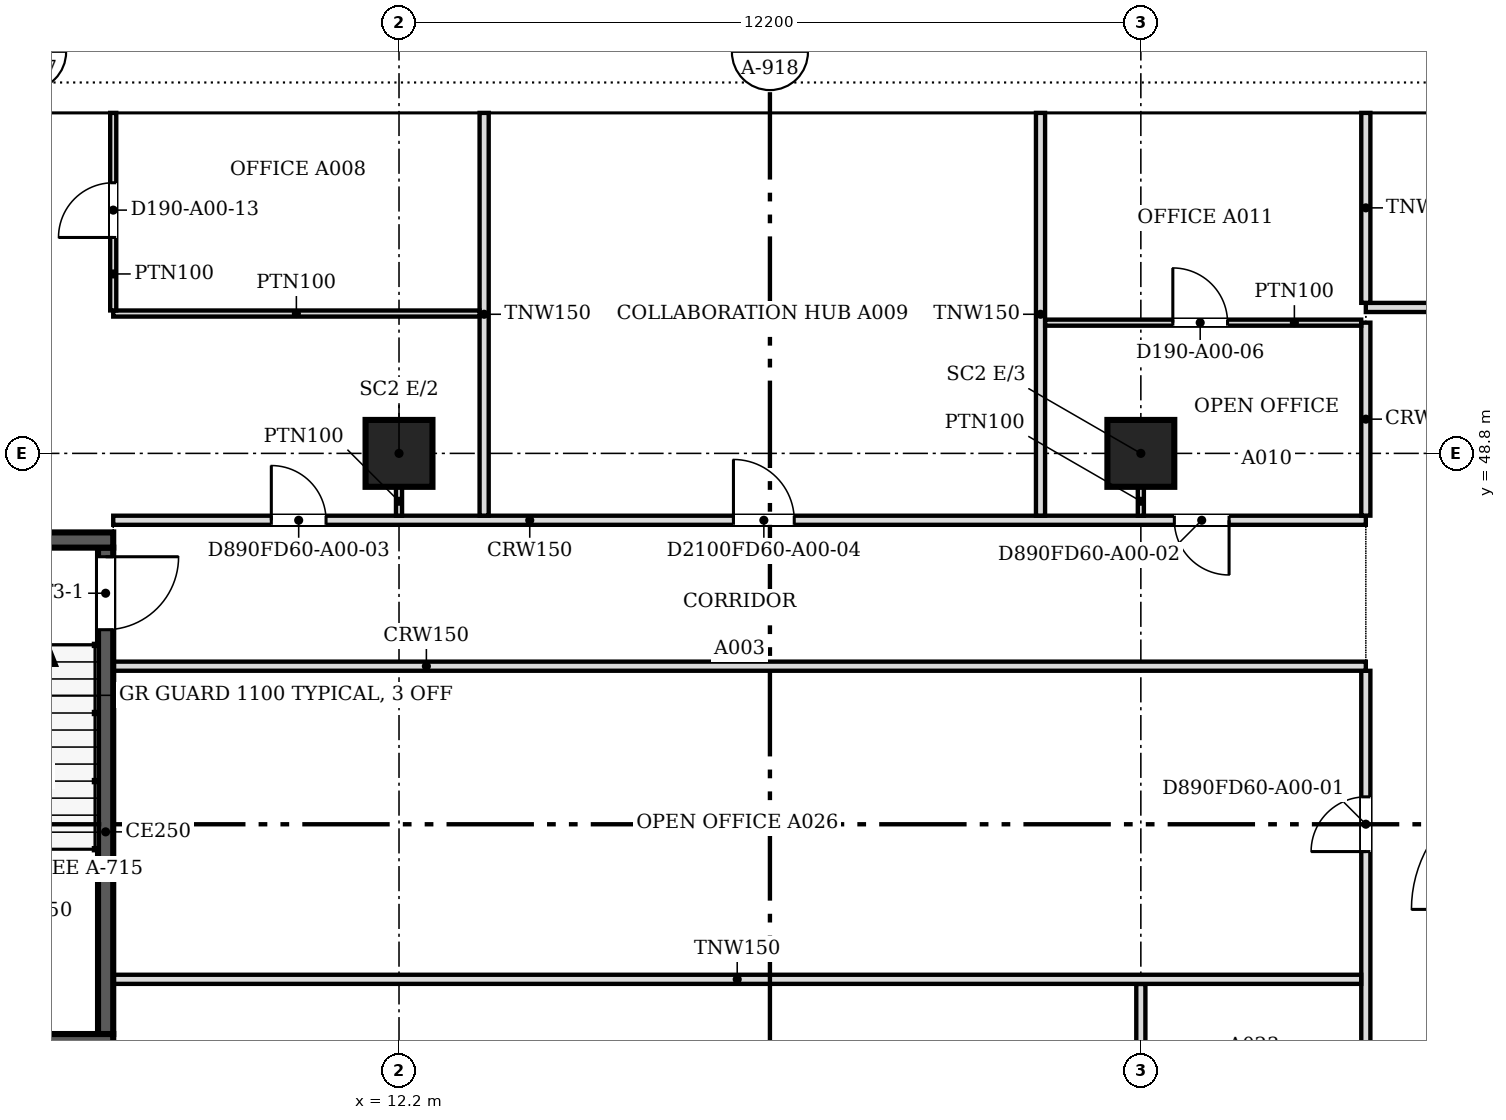
"""IFC4 building model, lengths in metres.
Left out: names, types, materials, properties, quantities, classifications, styles, units other than length and angle.
Written with IfcOpenShell. Run it as: python <this file> out.ifc"""

import sys

from ifc_helpers import new_model, si_unit, direction, frame, frame_2d, origin, origin_2d, place, context, subcontext, project, spatial, polyline, rectangle, outline, extrude, faceted_brep, source, transform, mapped, element, fill, save


model = new_model("IFC4")
c1 = context("Model", 3, precision=1e-05, world=origin(), true_north=direction((0.0, 1.0)))
c2 = subcontext(c1, "Body", "Model", "MODEL_VIEW")
j1 = project(units=[si_unit("LENGTHUNIT", "METRE"), si_unit("PLANEANGLEUNIT", "RADIAN")], contexts=[c1])
p1 = place(None, origin())
s1 = spatial("IfcSite", under=j1, at=p1, CompositionType="ELEMENT")
p2 = place(p1, origin())
s2 = spatial("IfcBuilding", under=s1, at=p2, CompositionType="ELEMENT")
p3 = place(p2, frame((0.0, 0.0, 16.8)))
s3 = spatial("IfcBuildingStorey", under=s2, at=p3, CompositionType="ELEMENT", Elevation=16.8)
for number, where, z_axis, x_axis in (
    (1, (12.2, 48.8, 0.0), (0.0, 0.0, 1.0), (1.0, 0.0, 0.0)),
    (2, (24.4, 48.8, 0.0), (0.0, 0.0, 1.0), (1.0, 0.0, 0.0)),
):
    element("IfcColumn", number, at=place(p3, frame(where, z_axis=z_axis, x_axis=x_axis)), inside=s3, PredefinedType="COLUMN", context=c2, shape_type="SweptSolid", body=[
        extrude(rectangle(XDim=1.1, YDim=1.1, at=origin_2d()), origin(), (0.0, 0.0, 1.0), 4.3),
    ])
m1 = source(origin(), c2, "Body", "SweptSolid", [
    extrude(outline(polyline([(6.1, 0.0), (3.05, 4.5), (0.0, 0.0), (6.1, 0.0)])), frame((0.0, 0.25, 0.0), z_axis=(0.0, -1.0, 0.0), x_axis=(1.0, 0.0, 0.0)), (0.0, 0.0, 1.0), 0.5),
])
p4 = place(p3, frame((33.55, 54.65, 0.0), z_axis=(0.0, 0.0, 1.0), x_axis=(-1.0, 0.0, 0.0)))
e3 = element("IfcWall", 3, at=p4, inside=s3, PredefinedType="SOLIDWALL", context=c2, shape_type="MappedRepresentation", body=[
    mapped(m1, transform((0.0, 0.0, 0.0), scale=1.0)),
])
m2 = source(origin(), c2, "Body", "SweptSolid", [
    extrude(outline(polyline([(5.629, 0.25), (3.05, 4.054), (0.471, 0.25), (5.629, 0.25)])), frame((0.0, 0.26, 0.0), z_axis=(0.0, -1.0, 0.0), x_axis=(1.0, 0.0, 0.0)), (0.0, 0.0, 1.0), 0.52),
])
p5 = place(p4, origin())
e4 = element("IfcOpeningElement", 4, at=p5, cuts=e3, PredefinedType="OPENING", context=c2, shape_type="MappedRepresentation", body=[
    mapped(m2, transform((0.0, 0.0, 0.0), scale=1.0)),
])
m3 = source(origin(), c2, "Body", "Brep", [
    faceted_brep([(6.1, -0.25, 0.0), (3.05, -0.25, 4.5), (0.0, -0.25, 0.0), (6.1, -0.25, 0.0), (0.0, 0.25, 0.0), (3.05, 0.25, 4.5), (6.1, 0.25, 0.0), (6.1, 0.25, 0.0)], [[[0, 1, 2, 3]], [[4, 5, 6, 7]], [[6, 5, 1, 0]], [[5, 4, 2, 1]], [[4, 7, 3, 2]], [[3, 7, 6, 0]]]),
])
p6 = place(p3, frame((27.45, 54.65, 0.0), z_axis=(0.0, 0.0, 1.0), x_axis=(-1.0, 0.0, 0.0)))
e5 = element("IfcWall", 5, at=p6, inside=s3, PredefinedType="SOLIDWALL", context=c2, shape_type="MappedRepresentation", body=[
    mapped(m3, transform((0.0, 0.0, 0.0), scale=1.0)),
])
p7 = place(p6, origin())
e6 = element("IfcOpeningElement", 6, at=p7, cuts=e5, PredefinedType="OPENING", context=c2, shape_type="MappedRepresentation", body=[
    mapped(m2, transform((0.0, 0.0, 0.0), scale=1.0)),
])
p8 = place(p3, frame((21.35, 54.65, 0.0), z_axis=(0.0, 0.0, 1.0), x_axis=(-1.0, 0.0, 0.0)))
e7 = element("IfcWall", 7, at=p8, inside=s3, PredefinedType="SOLIDWALL", context=c2, shape_type="MappedRepresentation", body=[
    mapped(m1, transform((0.0, 0.0, 0.0), scale=1.0)),
])
p9 = place(p8, origin())
e8 = element("IfcOpeningElement", 8, at=p9, cuts=e7, PredefinedType="OPENING", context=c2, shape_type="MappedRepresentation", body=[
    mapped(m2, transform((0.0, 0.0, 0.0), scale=1.0)),
])
p10 = place(p3, frame((15.25, 54.65, 0.0), z_axis=(0.0, 0.0, 1.0), x_axis=(-1.0, 0.0, 0.0)))
e9 = element("IfcWall", 9, at=p10, inside=s3, PredefinedType="SOLIDWALL", context=c2, shape_type="MappedRepresentation", body=[
    mapped(m1, transform((0.0, 0.0, 0.0), scale=1.0)),
])
p11 = place(p10, origin())
e10 = element("IfcOpeningElement", 10, at=p11, cuts=e9, PredefinedType="OPENING", context=c2, shape_type="MappedRepresentation", body=[
    mapped(m2, transform((0.0, 0.0, 0.0), scale=1.0)),
])
m4 = source(origin(), c2, "Body", "Brep", [
    faceted_brep([(3.05, -0.25, 4.429), (3.003, -0.25, 4.5), (0.0, -0.25, 0.0), (3.05, -0.25, 0.0), (0.0, 0.25, 0.0), (2.957, 0.25, 4.43), (2.957, 0.25, 0.0), (3.003, 0.0, 4.5)], [[[0, 1, 2, 3]], [[4, 5, 6]], [[7, 1, 0]], [[5, 4, 2, 1, 7]], [[4, 6, 3, 2]], [[3, 6, 5, 7, 0]]]),
])
p12 = place(p3, frame((9.15, 54.65, 0.0), z_axis=(0.0, 0.0, 1.0), x_axis=(-1.0, 0.0, 0.0)))
e11 = element("IfcWall", 11, at=p12, inside=s3, PredefinedType="SOLIDWALL", context=c2, shape_type="MappedRepresentation", body=[
    mapped(m4, transform((0.0, 0.0, 0.0), scale=1.0)),
])
m5 = source(origin(), c2, "Body", "SweptSolid", [
    extrude(outline(polyline([(2.803, 3.75), (0.468, 0.25), (2.803, 0.25), (2.803, 3.75)])), frame((0.0, 0.26, 0.0), z_axis=(0.0, -1.0, 0.0), x_axis=(1.0, 0.0, 0.0)), (0.0, 0.0, 1.0), 0.52),
])
p13 = place(p12, origin())
e12 = element("IfcOpeningElement", 12, at=p13, cuts=e11, PredefinedType="OPENING", context=c2, shape_type="MappedRepresentation", body=[
    mapped(m5, transform((0.0, 0.0, 0.0), scale=1.0)),
])
p14 = place(p2, frame((0.0, 0.0, 21.3)))
s4 = spatial("IfcBuildingStorey", under=s2, at=p14, CompositionType="ELEMENT", Elevation=21.3)
m6 = source(origin(), c2, "Body", "SweptSolid", [
    extrude(outline(polyline([(3.05, 0.0), (6.1, 4.5), (3.05, 9.0), (0.0, 4.5), (3.05, 0.0)])), frame((0.0, 0.25, 0.0), z_axis=(0.0, -1.0, 0.0), x_axis=(1.0, 0.0, 0.0)), (0.0, 0.0, 1.0), 0.5),
])
p15 = place(p14, frame((30.5, 54.65, -4.5), z_axis=(0.0, 0.0, 1.0), x_axis=(-1.0, 0.0, 0.0)))
e13 = element("IfcWall", 13, at=p15, inside=s4, PredefinedType="SOLIDWALL", context=c2, shape_type="MappedRepresentation", body=[
    mapped(m6, transform((0.0, 0.0, 0.0), scale=1.0)),
])
m7 = source(origin(), c2, "Body", "SweptSolid", [
    extrude(outline(polyline([(3.05, 0.446), (5.798, 4.5), (3.05, 8.554), (0.302, 4.5), (3.05, 0.446)])), frame((0.0, 0.26, 0.0), z_axis=(0.0, -1.0, 0.0), x_axis=(1.0, 0.0, 0.0)), (0.0, 0.0, 1.0), 0.52),
])
p16 = place(p15, origin())
e14 = element("IfcOpeningElement", 14, at=p16, cuts=e13, PredefinedType="OPENING", context=c2, shape_type="MappedRepresentation", body=[
    mapped(m7, transform((0.0, 0.0, 0.0), scale=1.0)),
])
m8 = source(origin(), c2, "Body", "Brep", [
    faceted_brep([(3.05, -0.25, 0.0), (6.1, -0.25, 4.5), (6.1, -0.25, 4.5), (3.05, -0.25, 9.0), (0.0, -0.25, 4.5), (0.0, 0.25, 4.5), (3.05, 0.25, 9.0), (6.1, 0.25, 4.5), (6.1, 0.25, 4.5), (3.05, 0.25, 0.0)], [[[0, 1, 2, 3, 4]], [[5, 6, 7, 8, 9]], [[9, 8, 1, 0]], [[7, 6, 3, 2]], [[6, 5, 4, 3]], [[5, 9, 0, 4]], [[1, 8, 7, 2]]]),
])
p17 = place(p14, frame((24.4, 54.65, -4.5), z_axis=(0.0, 0.0, 1.0), x_axis=(-1.0, 0.0, 0.0)))
e15 = element("IfcWall", 15, at=p17, inside=s4, PredefinedType="SOLIDWALL", context=c2, shape_type="MappedRepresentation", body=[
    mapped(m8, transform((0.0, 0.0, 0.0), scale=1.0)),
])
p18 = place(p17, origin())
e16 = element("IfcOpeningElement", 16, at=p18, cuts=e15, PredefinedType="OPENING", context=c2, shape_type="MappedRepresentation", body=[
    mapped(m7, transform((0.0, 0.0, 0.0), scale=1.0)),
])
p19 = place(p14, frame((18.3, 54.65, -4.5), z_axis=(0.0, 0.0, 1.0), x_axis=(-1.0, 0.0, 0.0)))
e17 = element("IfcWall", 17, at=p19, inside=s4, PredefinedType="SOLIDWALL", context=c2, shape_type="MappedRepresentation", body=[
    mapped(m6, transform((0.0, 0.0, 0.0), scale=1.0)),
])
p20 = place(p19, origin())
e18 = element("IfcOpeningElement", 18, at=p20, cuts=e17, PredefinedType="OPENING", context=c2, shape_type="MappedRepresentation", body=[
    mapped(m7, transform((0.0, 0.0, 0.0), scale=1.0)),
])
m9 = source(origin(), c2, "Body", "Brep", [
    faceted_brep([(3.05, -0.25, 0.0), (6.053, -0.25, 4.5), (3.05, -0.25, 9.0), (0.0, -0.25, 4.5), (0.0, 0.25, 4.5), (3.05, 0.25, 9.0), (6.007, 0.25, 4.57), (6.007, 0.25, 4.43), (3.05, 0.25, 0.0), (6.053, 0.0, 4.5)], [[[0, 1, 2, 3]], [[4, 5, 6, 7, 8]], [[8, 7, 9, 1, 0]], [[6, 5, 2, 1, 9]], [[5, 4, 3, 2]], [[4, 8, 0, 3]], [[9, 7, 6]]]),
])
p21 = place(p14, frame((12.2, 54.65, -4.5), z_axis=(0.0, 0.0, 1.0), x_axis=(-1.0, 0.0, 0.0)))
e19 = element("IfcWall", 19, at=p21, inside=s4, PredefinedType="SOLIDWALL", context=c2, shape_type="MappedRepresentation", body=[
    mapped(m9, transform((0.0, 0.0, 0.0), scale=1.0)),
])
m10 = source(origin(), c2, "Body", "SweptSolid", [
    extrude(outline(polyline([(3.048, 0.448), (5.753, 4.5), (3.048, 8.552), (0.302, 4.5), (3.048, 0.448)])), frame((0.0, 0.26, 0.0), z_axis=(0.0, -1.0, 0.0), x_axis=(1.0, 0.0, 0.0)), (0.0, 0.0, 1.0), 0.52),
])
p22 = place(p21, origin())
e20 = element("IfcOpeningElement", 20, at=p22, cuts=e19, PredefinedType="OPENING", context=c2, shape_type="MappedRepresentation", body=[
    mapped(m10, transform((0.0, 0.0, 0.0), scale=1.0)),
])
for number, where, z_axis, x_axis in (
    (21, (7.5, 39.125, 0.0), (0.0, 0.0, 1.0), (-1.0, 0.0, 0.0)),
    (22, (3.6, 47.375, 0.0), (0.0, 0.0, 1.0), (1.0, 0.0, 0.0)),
):
    element("IfcWall", number, at=place(p3, frame(where, z_axis=z_axis, x_axis=x_axis)), inside=s3, PredefinedType="SOLIDWALL", context=c2, shape_type="SweptSolid", body=[
        extrude(rectangle(XDim=3.9, YDim=0.25, at=frame_2d((1.95, 0.0))), origin(), (0.0, 0.0, 1.0), 4.5),
    ])
p23 = place(p3, frame((7.375, 47.25, 0.0), z_axis=(0.0, 0.0, 1.0), x_axis=(0.0, -1.0, 0.0)))
e23 = element("IfcWall", 23, at=p23, inside=s3, PredefinedType="SOLIDWALL", context=c2, shape_type="SweptSolid", body=[
    extrude(rectangle(XDim=8.0, YDim=0.25, at=frame_2d((4.0, 0.0))), origin(), (0.0, 0.0, 1.0), 4.5),
])
m11 = source(origin(), c2, "Body", "SweptSolid", [
    extrude(rectangle(XDim=1.2, YDim=2.1, at=frame_2d((0.6, 1.05))), frame((0.0, 0.135, 0.0), z_axis=(0.0, -1.0, 0.0), x_axis=(1.0, 0.0, 0.0)), (0.0, 0.0, 1.0), 0.27),
])
p24 = place(p23, frame((0.15, 0.0, 0.0)))
e24 = element("IfcOpeningElement", 24, at=p24, cuts=e23, PredefinedType="OPENING", context=c2, shape_type="MappedRepresentation", body=[
    mapped(m11, transform((0.0, 0.0, 0.0), scale=1.0)),
])
p25 = place(p3, frame((28.1, 18.8, 0.0), z_axis=(0.0, 0.0, 1.0), x_axis=(0.0, 1.0, 0.0)))
e25 = element("IfcWall", 25, at=p25, inside=s3, PredefinedType="PARTITIONING", context=c2, shape_type="SweptSolid", body=[
    extrude(rectangle(XDim=26.424, YDim=0.15, at=frame_2d((13.212, 0.0))), origin(), (0.0, 0.0, 1.0), 3.415),
])
m12 = source(origin(), c2, "Body", "SweptSolid", [
    extrude(rectangle(XDim=0.9, YDim=2.1, at=frame_2d((0.45, 1.05))), frame((0.0, 0.085, 0.0), z_axis=(0.0, -1.0, 0.0), x_axis=(1.0, 0.0, 0.0)), (0.0, 0.0, 1.0), 0.17),
])
p26 = place(p25, frame((23.451, 0.0, 0.0)))
e26 = element("IfcOpeningElement", 26, at=p26, cuts=e25, PredefinedType="OPENING", context=c2, shape_type="MappedRepresentation", body=[
    mapped(m12, transform((0.0, 0.0, 0.0), scale=1.0)),
])
m13 = source(origin(), c2, "Body", "SweptSolid", [
    extrude(rectangle(XDim=1.0, YDim=2.1, at=frame_2d((0.5, 1.05))), frame((0.0, 0.085, 0.0), z_axis=(0.0, -1.0, 0.0), x_axis=(1.0, 0.0, 0.0)), (0.0, 0.0, 1.0), 0.17),
])
p27 = place(p25, frame((5.7, 0.0, 0.0)))
e27 = element("IfcOpeningElement", 27, at=p27, cuts=e25, PredefinedType="OPENING", context=c2, shape_type="MappedRepresentation", body=[
    mapped(m13, transform((0.0, 0.0, 0.0), scale=1.0)),
])
p28 = place(p25, frame((11.65, 0.0, 0.0)))
e28 = element("IfcOpeningElement", 28, at=p28, cuts=e25, PredefinedType="OPENING", context=c2, shape_type="MappedRepresentation", body=[
    mapped(m13, transform((0.0, 0.0, 0.0), scale=1.0)),
])
p29 = place(p25, frame((17.75, 0.0, 0.0)))
e29 = element("IfcOpeningElement", 29, at=p29, cuts=e25, PredefinedType="OPENING", context=c2, shape_type="MappedRepresentation", body=[
    mapped(m13, transform((0.0, 0.0, 0.0), scale=1.0)),
])
p30 = place(p3, frame((24.4, 37.151, 0.0), z_axis=(0.0, 0.0, 1.0), x_axis=(0.0, 1.0, 0.0)))
e30 = element("IfcWall", 30, at=p30, inside=s3, PredefinedType="PARTITIONING", context=c2, shape_type="SweptSolid", body=[
    extrude(rectangle(XDim=2.923, YDim=0.15, at=frame_2d((1.461, 0.0))), origin(), (0.0, 0.0, 1.0), 3.415),
])
p31 = place(p3, frame((7.5, 40.15, 0.0), z_axis=(0.0, 0.0, 1.0), x_axis=(1.0, 0.0, 0.0)))
e31 = element("IfcWall", 31, at=p31, inside=s3, PredefinedType="PARTITIONING", context=c2, shape_type="SweptSolid", body=[
    extrude(rectangle(XDim=20.524, YDim=0.15, at=frame_2d((10.262, 0.0))), origin(), (0.0, 0.0, 1.0), 3.415),
])
p32 = place(p3, frame((7.5, 45.3, 0.0), z_axis=(0.0, 0.0, 1.0), x_axis=(1.0, 0.0, 0.0)))
e32 = element("IfcWall", 32, at=p32, inside=s3, PredefinedType="PARTITIONING", context=c2, shape_type="SweptSolid", body=[
    extrude(rectangle(XDim=20.6, YDim=0.15, at=frame_2d((10.3, 0.0))), origin(), (0.0, 0.0, 1.0), 3.415),
])
p33 = place(p3, frame((7.5, 47.7, 0.0), z_axis=(0.0, 0.0, 1.0), x_axis=(1.0, 0.0, 0.0)))
e33 = element("IfcWall", 33, at=p33, inside=s3, PredefinedType="PARTITIONING", context=c2, shape_type="SweptSolid", body=[
    extrude(rectangle(XDim=20.6, YDim=0.15, at=frame_2d((10.3, 0.0))), origin(), (0.0, 0.0, 1.0), 3.415),
])
p34 = place(p33, frame((17.451, 0.0, 0.0)))
e34 = element("IfcOpeningElement", 34, at=p34, cuts=e33, PredefinedType="OPENING", context=c2, shape_type="MappedRepresentation", body=[
    mapped(m12, transform((0.0, 0.0, 0.0), scale=1.0)),
])
p35 = place(p33, frame((2.6, 0.0, 0.0)))
e35 = element("IfcOpeningElement", 35, at=p35, cuts=e33, PredefinedType="OPENING", context=c2, shape_type="MappedRepresentation", body=[
    mapped(m12, transform((0.0, 0.0, 0.0), scale=1.0)),
])
p36 = place(p33, frame((10.2, 0.0, 0.0)))
e36 = element("IfcOpeningElement", 36, at=p36, cuts=e33, PredefinedType="OPENING", context=c2, shape_type="MappedRepresentation", body=[
    mapped(m13, transform((0.0, 0.0, 0.0), scale=1.0)),
])
for number, where, z_axis, x_axis in (
    (37, (13.6, 47.776, 0.0), (0.0, 0.0, 1.0), (0.0, 1.0, 0.0)),
    (38, (22.75, 47.776, 0.0), (0.0, 0.0, 1.0), (0.0, 1.0, 0.0)),
):
    element("IfcWall", number, at=place(p3, frame(where, z_axis=z_axis, x_axis=x_axis)), inside=s3, PredefinedType="PARTITIONING", context=c2, shape_type="SweptSolid", body=[
        extrude(rectangle(XDim=6.624, YDim=0.15, at=frame_2d((3.312, 0.0))), origin(), (0.0, 0.0, 1.0), 3.415),
    ])
p37 = place(p3, frame((28.1, 47.776, 0.0), z_axis=(0.0, 0.0, 1.0), x_axis=(0.0, 1.0, 0.0)))
e39 = element("IfcWall", 39, at=p37, inside=s3, PredefinedType="PARTITIONING", context=c2, shape_type="SweptSolid", body=[
    extrude(rectangle(XDim=3.174, YDim=0.15, at=frame_2d((1.587, 0.0))), origin(), (0.0, 0.0, 1.0), 3.415),
])
for number, where, z_axis, x_axis in (
    (40, (12.2, 48.25, 0.0), (0.0, 0.0, 1.0), (0.0, -1.0, 0.0)),
    (41, (24.4, 48.25, 0.0), (0.0, 0.0, 1.0), (0.0, -1.0, 0.0)),
):
    element("IfcWall", number, at=place(p3, frame(where, z_axis=z_axis, x_axis=x_axis)), inside=s3, PredefinedType="PARTITIONING", context=c2, shape_type="SweptSolid", body=[
        extrude(rectangle(XDim=0.475, YDim=0.1, at=frame_2d((0.238, 0.0))), origin(), (0.0, 0.0, 1.0), 3.415),
    ])
p38 = place(p3, frame((22.826, 50.95, 0.0), z_axis=(0.0, 0.0, 1.0), x_axis=(1.0, 0.0, 0.0)))
e42 = element("IfcWall", 42, at=p38, inside=s3, PredefinedType="PARTITIONING", context=c2, shape_type="SweptSolid", body=[
    extrude(rectangle(XDim=5.198, YDim=0.1, at=frame_2d((2.599, 0.0))), origin(), (0.0, 0.0, 1.0), 3.415),
])
m14 = source(origin(), c2, "Body", "SweptSolid", [
    extrude(rectangle(XDim=0.9, YDim=2.1, at=frame_2d((0.45, 1.05))), frame((0.0, 0.06, 0.0), z_axis=(0.0, -1.0, 0.0), x_axis=(1.0, 0.0, 0.0)), (0.0, 0.0, 1.0), 0.12),
])
p39 = place(p38, frame((2.1, 0.0, 0.0)))
e43 = element("IfcOpeningElement", 43, at=p39, cuts=e42, PredefinedType="OPENING", context=c2, shape_type="MappedRepresentation", body=[
    mapped(m14, transform((0.0, 0.0, 0.0), scale=1.0)),
])
p40 = place(p3, frame((7.5, 51.1, 0.0), z_axis=(0.0, 0.0, 1.0), x_axis=(1.0, 0.0, 0.0)))
e44 = element("IfcWall", 44, at=p40, inside=s3, PredefinedType="PARTITIONING", context=c2, shape_type="SweptSolid", body=[
    extrude(rectangle(XDim=6.024, YDim=0.1, at=frame_2d((3.012, 0.0))), origin(), (0.0, 0.0, 1.0), 3.415),
])
p41 = place(p3, frame((7.5, 54.4, 0.0), z_axis=(0.0, 0.0, 1.0), x_axis=(0.0, -1.0, 0.0)))
e45 = element("IfcWall", 45, at=p41, inside=s3, PredefinedType="PARTITIONING", context=c2, shape_type="SweptSolid", body=[
    extrude(rectangle(XDim=3.249, YDim=0.1, at=frame_2d((1.625, 0.0))), origin(), (0.0, 0.0, 1.0), 3.415),
])
p42 = place(p41, frame((1.149, 0.0, 0.0)))
e46 = element("IfcOpeningElement", 46, at=p42, cuts=e45, PredefinedType="OPENING", context=c2, shape_type="MappedRepresentation", body=[
    mapped(m14, transform((0.0, 0.0, 0.0), scale=1.0)),
])
p43 = place(p3, frame((28.1, 51.2, 0.0), z_axis=(0.0, 0.0, 1.0), x_axis=(1.0, 0.0, 0.0)))
e47 = element("IfcWall", 47, at=p43, inside=s3, PredefinedType="PARTITIONING", context=c2, shape_type="SweptSolid", body=[
    extrude(rectangle(XDim=31.438, YDim=0.15, at=frame_2d((15.719, 0.0))), origin(), (0.0, 0.0, 1.0), 3.415),
])
p44 = place(p43, frame((16.301, 0.0, 0.0)))
e48 = element("IfcOpeningElement", 48, at=p44, cuts=e47, PredefinedType="OPENING", context=c2, shape_type="MappedRepresentation", body=[
    mapped(m12, transform((0.0, 0.0, 0.0), scale=1.0)),
])
p45 = place(p43, frame((25.95, 0.0, 0.0)))
e49 = element("IfcOpeningElement", 49, at=p45, cuts=e47, PredefinedType="OPENING", context=c2, shape_type="MappedRepresentation", body=[
    mapped(m12, transform((0.0, 0.0, 0.0), scale=1.0)),
])
p46 = place(p43, frame((5.6, 0.0, 0.0)))
e50 = element("IfcOpeningElement", 50, at=p46, cuts=e47, PredefinedType="OPENING", context=c2, shape_type="MappedRepresentation", body=[
    mapped(m12, transform((0.0, 0.0, 0.0), scale=1.0)),
])
p47 = place(p3, frame((28.1, 51.276, 0.0), z_axis=(0.0, 0.0, 1.0), x_axis=(0.0, 1.0, 0.0)))
e51 = element("IfcWall", 51, at=p47, inside=s3, PredefinedType="PARTITIONING", context=c2, shape_type="SweptSolid", body=[
    extrude(rectangle(XDim=3.124, YDim=0.15, at=frame_2d((1.562, 0.0))), origin(), (0.0, 0.0, 1.0), 3.415),
])
m15 = source(origin(), c2, "Body", "SweptSolid", [
    extrude(rectangle(XDim=1.2, YDim=2.1, at=frame_2d((0.6, 1.05))), frame((0.0, 0.025, 0.0), z_axis=(0.0, -1.0, 0.0), x_axis=(1.0, 0.0, 0.0)), (0.0, 0.0, 1.0), 0.05),
])
p48 = place(p24, origin())
e52 = element("IfcDoor", 52, at=p48, inside=s3, OperationType="SINGLE_SWING_LEFT", PredefinedType="DOOR", context=c2, shape_type="MappedRepresentation", body=[
    mapped(m15, transform((0.0, 0.0, 0.0), scale=1.0)),
])
fill(e24, e52)
m16 = source(origin(), c2, "Body", "SweptSolid", [
    extrude(rectangle(XDim=0.9, YDim=2.1, at=frame_2d((0.45, 1.05))), frame((0.0, 0.025, 0.0), z_axis=(0.0, -1.0, 0.0), x_axis=(1.0, 0.0, 0.0)), (0.0, 0.0, 1.0), 0.05),
])
p49 = place(p26, origin())
e53 = element("IfcDoor", 53, at=p49, inside=s3, OperationType="SINGLE_SWING_LEFT", PredefinedType="DOOR", context=c2, shape_type="MappedRepresentation", body=[
    mapped(m16, transform((0.0, 0.0, 0.0), scale=1.0)),
])
fill(e26, e53)
p50 = place(p39, origin())
e54 = element("IfcDoor", 54, at=p50, inside=s3, OperationType="SINGLE_SWING_LEFT", PredefinedType="DOOR", context=c2, shape_type="MappedRepresentation", body=[
    mapped(m16, transform((0.0, 0.0, 0.0), scale=1.0)),
])
fill(e43, e54)
p51 = place(p34, origin())
e55 = element("IfcDoor", 55, at=p51, inside=s3, OperationType="SINGLE_SWING_RIGHT", PredefinedType="DOOR", context=c2, shape_type="MappedRepresentation", body=[
    mapped(m16, transform((0.0, 0.0, 0.0), scale=1.0)),
])
fill(e34, e55)
p52 = place(p35, origin())
e56 = element("IfcDoor", 56, at=p52, inside=s3, OperationType="SINGLE_SWING_LEFT", PredefinedType="DOOR", context=c2, shape_type="MappedRepresentation", body=[
    mapped(m16, transform((0.0, 0.0, 0.0), scale=1.0)),
])
fill(e35, e56)
m17 = source(origin(), c2, "Body", "SweptSolid", [
    extrude(rectangle(XDim=1.0, YDim=2.1, at=frame_2d((0.5, 1.05))), frame((0.0, 0.025, 0.0), z_axis=(0.0, -1.0, 0.0), x_axis=(1.0, 0.0, 0.0)), (0.0, 0.0, 1.0), 0.05),
])
p53 = place(p36, origin())
e57 = element("IfcDoor", 57, at=p53, inside=s3, OperationType="SINGLE_SWING_LEFT", PredefinedType="DOOR", context=c2, shape_type="MappedRepresentation", body=[
    mapped(m17, transform((0.0, 0.0, 0.0), scale=1.0)),
])
fill(e36, e57)
p54 = place(p42, origin())
e58 = element("IfcDoor", 58, at=p54, inside=s3, OperationType="SINGLE_SWING_RIGHT", PredefinedType="DOOR", context=c2, shape_type="MappedRepresentation", body=[
    mapped(m16, transform((0.0, 0.0, 0.0), scale=1.0)),
])
fill(e46, e58)
save(model, sys.argv[1])
